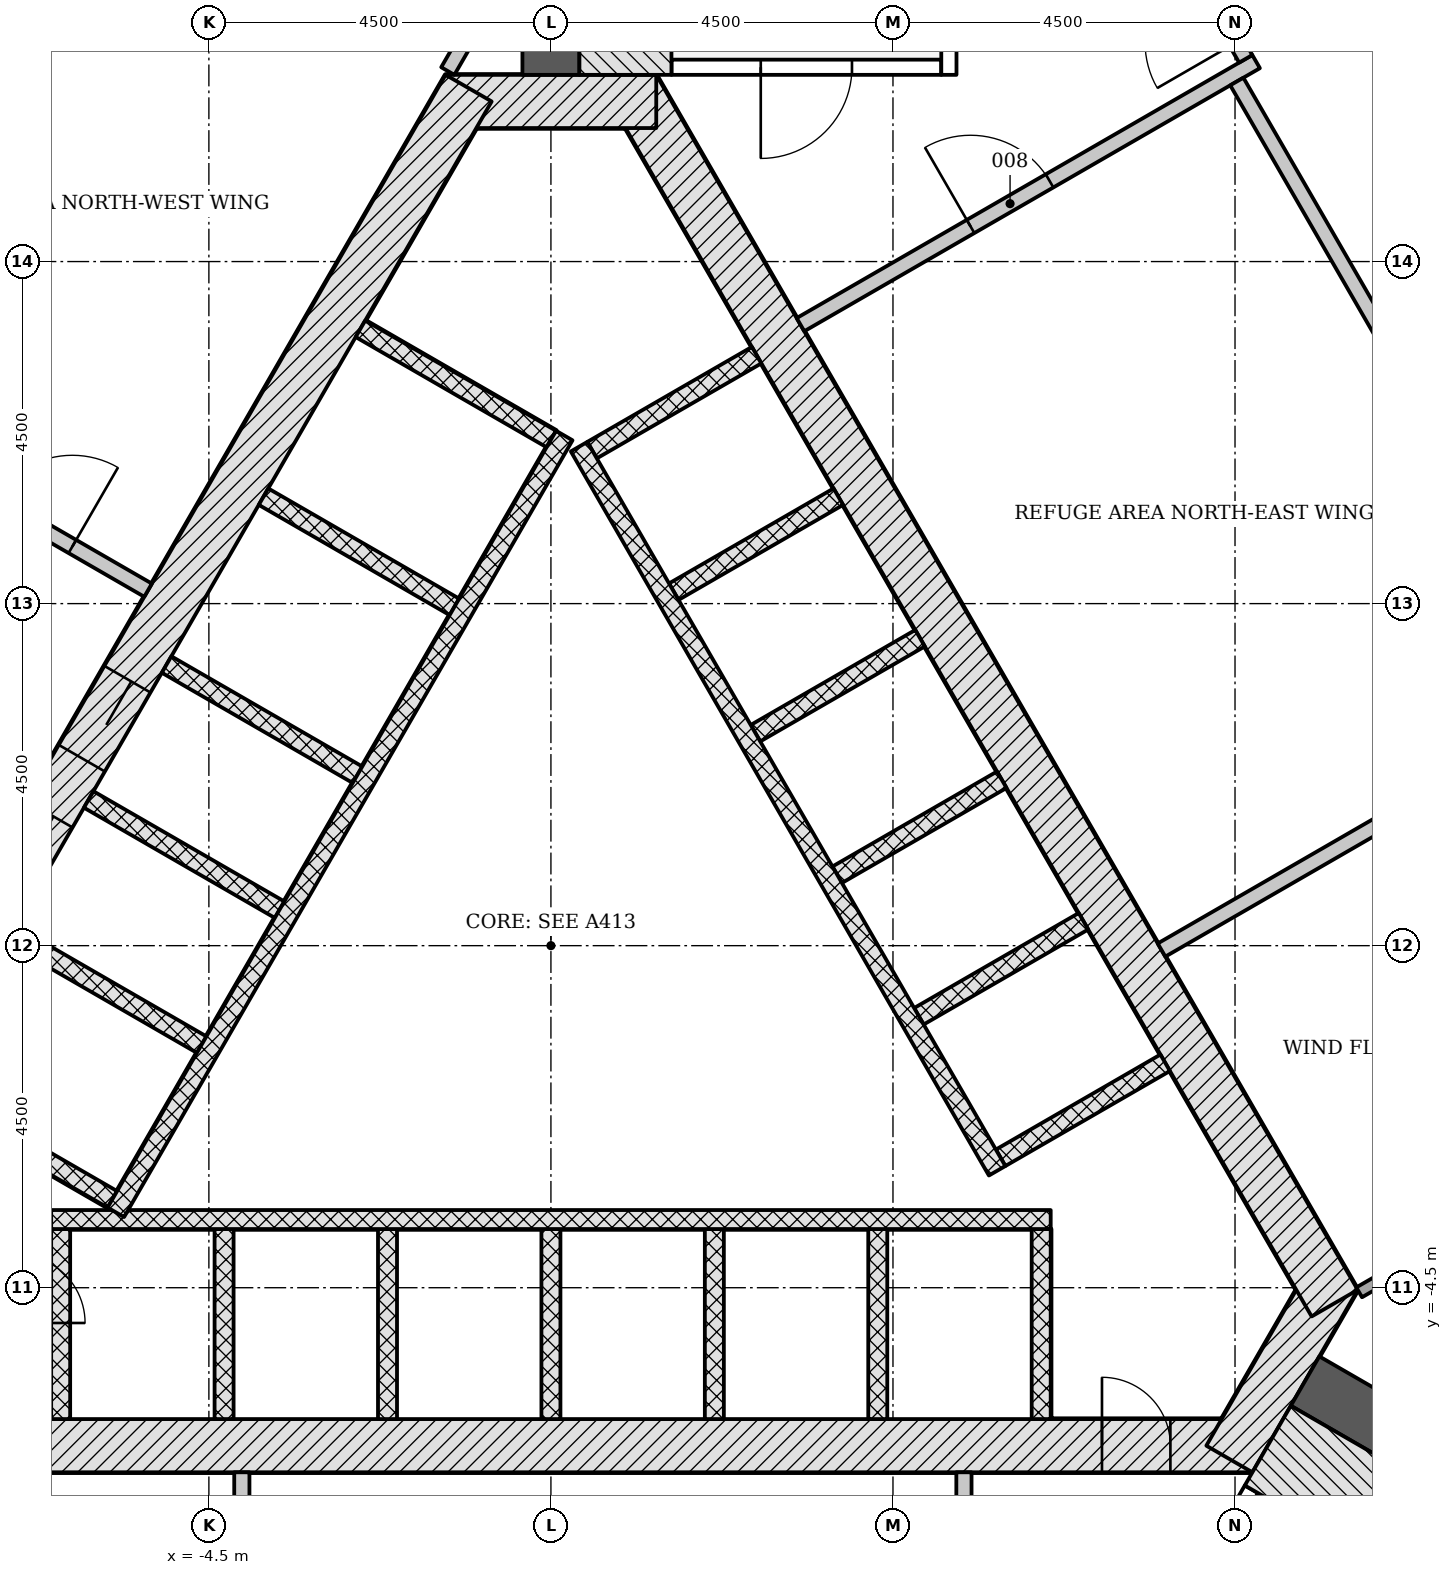
"""IFC4 building model, lengths in metres.
Left out: names, types, materials, properties, quantities, classifications, styles, units other than length and angle.
Written with IfcOpenShell. Run it as: python <this file> out.ifc"""

import sys

from ifc_helpers import new_model, si_unit, direction, frame, frame_2d, origin, place, context, subcontext, project, spatial, rectangle, extrude, element, fill, save


model = new_model("IFC4")
c1 = context("Model", 3, precision=1e-05, world=origin(), true_north=direction((0.0, 1.0)))
c2 = subcontext(c1, "Body", "Model", "MODEL_VIEW")
j1 = project(units=[si_unit("LENGTHUNIT", "METRE"), si_unit("PLANEANGLEUNIT", "RADIAN")], contexts=[c1])
p1 = place(None, origin())
s1 = spatial("IfcSite", under=j1, at=p1, CompositionType="ELEMENT")
p2 = place(p1, origin())
s2 = spatial("IfcBuilding", under=s1, at=p2, CompositionType="ELEMENT")
p3 = place(p2, frame((0.0, 0.0, 127.5)))
s3 = spatial("IfcBuildingStorey", under=s2, at=p3, CompositionType="ELEMENT", Elevation=127.5)
p4 = place(p3, frame((-9.229, -6.578, -0.3), z_axis=(0.0, 0.0, 1.0), x_axis=(1.0, 0.0, 0.0)))
e1 = element("IfcWall", 1, at=p4, inside=s3, PredefinedType="SHEAR", context=c2, shape_type="SweptSolid", body=[
    extrude(rectangle(XDim=18.458, YDim=0.7, at=frame_2d((9.229, 0.0))), origin(), (0.0, 0.0, 1.0), 7.2),
])
p5 = place(p4, frame((1.0, 0.0, 0.3)))
e2 = element("IfcOpeningElement", 2, at=p5, cuts=e1, PredefinedType="OPENING", context=c2, shape_type="SweptSolid", body=[
    extrude(rectangle(XDim=1.0, YDim=2.1, at=frame_2d((0.5, 1.05))), frame((0.0, 0.36, 0.0), z_axis=(0.0, -1.0, 0.0), x_axis=(1.0, 0.0, 0.0)), (0.0, 0.0, 1.0), 0.72),
])
p6 = place(p4, frame((16.479, 0.0, 0.3)))
e3 = element("IfcOpeningElement", 3, at=p6, cuts=e1, PredefinedType="OPENING", context=c2, shape_type="SweptSolid", body=[
    extrude(rectangle(XDim=0.9, YDim=2.1, at=frame_2d((0.45, 1.05))), frame((0.0, 0.36, 0.0), z_axis=(0.0, -1.0, 0.0), x_axis=(1.0, 0.0, 0.0)), (0.0, 0.0, 1.0), 0.72),
])
p7 = place(p3, frame((8.926, -6.753, -0.3), z_axis=(0.0, 0.0, 1.0), x_axis=(0.500042739161, 0.866000726912, 0.0)))
e4 = element("IfcWall", 4, at=p7, inside=s3, PredefinedType="SHEAR", context=c2, shape_type="SweptSolid", body=[
    extrude(rectangle(XDim=2.771, YDim=0.7, at=frame_2d((1.386, 0.0))), origin(), (0.0, 0.0, 1.0), 7.2),
])
p8 = place(p3, frame((10.311, -4.703, -0.3), z_axis=(0.0, 0.0, 1.0), x_axis=(-0.500001446645, 0.866024568562, 0.0)))
e5 = element("IfcWall", 5, at=p8, inside=s3, PredefinedType="SHEAR", context=c2, shape_type="SweptSolid", body=[
    extrude(rectangle(XDim=18.458, YDim=0.7, at=frame_2d((9.229, 0.0))), origin(), (0.0, 0.0, 1.0), 7.2),
])
p9 = place(p3, frame((1.386, 11.106, -0.3), z_axis=(0.0, 0.0, 1.0), x_axis=(-1.0, 0.0, 0.0)))
e6 = element("IfcWall", 6, at=p9, inside=s3, PredefinedType="SHEAR", context=c2, shape_type="SweptSolid", body=[
    extrude(rectangle(XDim=2.771, YDim=0.7, at=frame_2d((1.386, 0.0))), origin(), (0.0, 0.0, 1.0), 7.2),
])
p10 = place(p3, frame((-1.083, 11.281, -0.3), z_axis=(0.0, 0.0, 1.0), x_axis=(-0.500001446645, -0.866024568562, 0.0)))
e7 = element("IfcWall", 7, at=p10, inside=s3, PredefinedType="SHEAR", context=c2, shape_type="SweptSolid", body=[
    extrude(rectangle(XDim=18.458, YDim=0.7, at=frame_2d((9.229, 0.0))), origin(), (0.0, 0.0, 1.0), 7.2),
])
p11 = place(p10, frame((8.979, 0.0, 0.3)))
e8 = element("IfcOpeningElement", 8, at=p11, cuts=e7, PredefinedType="OPENING", context=c2, shape_type="SweptSolid", body=[
    extrude(rectangle(XDim=1.2, YDim=2.1, at=frame_2d((0.6, 1.05))), frame((0.0, 0.36, 0.0), z_axis=(0.0, -1.0, 0.0), x_axis=(1.0, 0.0, 0.0)), (0.0, 0.0, 1.0), 0.72),
])
p12 = place(p10, frame((11.029, 0.0, 0.3)))
e9 = element("IfcOpeningElement", 9, at=p12, cuts=e7, PredefinedType="OPENING", context=c2, shape_type="SweptSolid", body=[
    extrude(rectangle(XDim=1.2, YDim=2.1, at=frame_2d((0.6, 1.05))), frame((0.0, 0.36, 0.0), z_axis=(0.0, -1.0, 0.0), x_axis=(1.0, 0.0, 0.0)), (0.0, 0.0, 1.0), 0.72),
])
p13 = place(p3, frame((0.0, 11.456, -0.3), z_axis=(0.0, 0.0, 1.0), x_axis=(0.0, 1.0, 0.0)))
e10 = element("IfcWall", 10, at=p13, inside=s3, PredefinedType="SHEAR", context=c2, shape_type="SweptSolid", body=[
    extrude(rectangle(XDim=11.539, YDim=0.75, at=frame_2d((5.77, 0.0))), origin(), (0.0, 0.0, 1.0), 7.2),
])
p14 = place(p3, frame((9.922, -5.728, -0.3), z_axis=(0.0, 0.0, 1.0), x_axis=(0.866024913782, -0.500000848707, 0.0)))
e11 = element("IfcWall", 11, at=p14, inside=s3, PredefinedType="SHEAR", context=c2, shape_type="SweptSolid", body=[
    extrude(rectangle(XDim=11.539, YDim=0.75, at=frame_2d((5.769, 0.0))), origin(), (0.0, 0.0, 1.0), 7.2),
])
for number, where, z_axis, x_axis in (
    (12, (-6.45, -6.228, -0.3), (0.0, 0.0, 1.0), (0.0, 1.0, 0.0)),
    (13, (-4.3, -6.228, -0.3), (0.0, 0.0, 1.0), (0.0, 1.0, 0.0)),
    (14, (-2.15, -6.228, -0.3), (0.0, 0.0, 1.0), (0.0, 1.0, 0.0)),
    (15, (0.0, -6.228, -0.3), (0.0, 0.0, 1.0), (0.0, 1.0, 0.0)),
    (16, (2.15, -6.228, -0.3), (0.0, 0.0, 1.0), (0.0, 1.0, 0.0)),
    (17, (4.3, -6.228, -0.3), (0.0, 0.0, 1.0), (0.0, 1.0, 0.0)),
    (18, (6.45, -6.228, -0.3), (0.0, 0.0, 1.0), (0.0, 1.0, 0.0)),
):
    element("IfcWall", number, at=place(p3, frame(where, z_axis=z_axis, x_axis=x_axis)), inside=s3, PredefinedType="PARTITIONING", context=c2, shape_type="SweptSolid", body=[
        extrude(rectangle(XDim=2.5, YDim=0.25, at=frame_2d((1.25, 0.0))), origin(), (0.0, 0.0, 1.0), 7.2),
    ])
p15 = place(p3, frame((-6.575, -3.603, 0.0), z_axis=(0.0, 0.0, 1.0), x_axis=(1.0, 0.0, 0.0)))
e19 = element("IfcWall", 19, at=p15, inside=s3, PredefinedType="PARTITIONING", context=c2, shape_type="SweptSolid", body=[
    extrude(rectangle(XDim=13.15, YDim=0.25, at=frame_2d((6.575, 0.0))), origin(), (0.0, 0.0, 1.0), 6.9),
])
for number, where, z_axis, x_axis in (
    (20, (8.081, -1.541, 0.0), (0.0, 0.0, 1.0), (-0.866, -0.5, 0.0)),
    (21, (7.006, 0.321, 0.0), (0.0, 0.0, 1.0), (-0.866, -0.5, 0.0)),
):
    element("IfcWall", number, at=place(p3, frame(where, z_axis=z_axis, x_axis=x_axis)), inside=s3, PredefinedType="PARTITIONING", context=c2, shape_type="SweptSolid", body=[
        extrude(rectangle(XDim=2.5, YDim=0.25, at=frame_2d((1.25, 0.0))), origin(), (0.0, 0.0, 1.0), 6.9),
    ])
p16 = place(p3, frame((5.931, 2.183, 0.0), z_axis=(0.0, 0.0, 1.0), x_axis=(-0.866047370643, -0.499961950354, 0.0)))
e22 = element("IfcWall", 22, at=p16, inside=s3, PredefinedType="PARTITIONING", context=c2, shape_type="SweptSolid", body=[
    extrude(rectangle(XDim=2.5, YDim=0.25, at=frame_2d((1.25, 0.0))), origin(), (0.0, 0.0, 1.0), 6.9),
])
for number, where, z_axis, x_axis in (
    (23, (4.856, 4.045, 0.0), (0.0, 0.0, 1.0), (-0.866, -0.5, 0.0)),
    (24, (3.781, 5.907, 0.0), (0.0, 0.0, 1.0), (-0.866, -0.5, 0.0)),
    (25, (2.706, 7.769, 0.0), (0.0, 0.0, 1.0), (-0.866, -0.5, 0.0)),
):
    element("IfcWall", number, at=place(p3, frame(where, z_axis=z_axis, x_axis=x_axis)), inside=s3, PredefinedType="PARTITIONING", context=c2, shape_type="SweptSolid", body=[
        extrude(rectangle(XDim=2.5, YDim=0.25, at=frame_2d((1.25, 0.0))), origin(), (0.0, 0.0, 1.0), 6.9),
    ])
p17 = place(p3, frame((5.87, -2.961, 0.0), z_axis=(0.0, 0.0, 1.0), x_axis=(-0.50000615651, 0.866021849293, 0.0)))
e26 = element("IfcWall", 26, at=p17, inside=s3, PredefinedType="PARTITIONING", context=c2, shape_type="SweptSolid", body=[
    extrude(rectangle(XDim=11.0, YDim=0.25, at=frame_2d((5.5, 0.0))), origin(), (0.0, 0.0, 1.0), 6.9),
])
p18 = place(p3, frame((-2.506, 8.115, -0.3), z_axis=(0.0, 0.0, 1.0), x_axis=(0.865996321171, -0.50005036918, 0.0)))
e27 = element("IfcWall", 27, at=p18, inside=s3, PredefinedType="PARTITIONING", context=c2, shape_type="SweptSolid", body=[
    extrude(rectangle(XDim=2.9, YDim=0.25, at=frame_2d((1.45, 0.0))), origin(), (0.0, 0.0, 1.0), 7.2),
])
for number, where, z_axis, x_axis in (
    (28, (-3.781, 5.907, -0.3), (0.0, 0.0, 1.0), (0.866, -0.5, 0.0)),
    (29, (-5.056, 3.699, -0.3), (0.0, 0.0, 1.0), (0.866, -0.5, 0.0)),
    (30, (-6.081, 1.923, -0.3), (0.0, 0.0, 1.0), (0.866, -0.5, 0.0)),
    (31, (-7.106, 0.148, -0.3), (0.0, 0.0, 1.0), (0.866, -0.5, 0.0)),
    (32, (-8.281, -1.887, -0.3), (0.0, 0.0, 1.0), (0.866, -0.5, 0.0)),
):
    element("IfcWall", number, at=place(p3, frame(where, z_axis=z_axis, x_axis=x_axis)), inside=s3, PredefinedType="PARTITIONING", context=c2, shape_type="SweptSolid", body=[
        extrude(rectangle(XDim=2.9, YDim=0.25, at=frame_2d((1.45, 0.0))), origin(), (0.0, 0.0, 1.0), 7.2),
    ])
p19 = place(p3, frame((0.176, 6.711, 0.0), z_axis=(0.0, 0.0, 1.0), x_axis=(-0.500004227369, -0.866022963098, 0.0)))
e33 = element("IfcWall", 33, at=p19, inside=s3, PredefinedType="PARTITIONING", context=c2, shape_type="SweptSolid", body=[
    extrude(rectangle(XDim=11.8, YDim=0.25, at=frame_2d((5.9, 0.0))), origin(), (0.0, 0.0, 1.0), 6.9),
])
p20 = place(p3, frame((5.135, 11.556, -0.3), z_axis=(0.0, 0.0, 1.0), x_axis=(-1.0, 0.0, 0.0)))
e34 = element("IfcWall", 34, at=p20, inside=s3, PredefinedType="SHEAR", context=c2, shape_type="SweptSolid", body=[
    extrude(rectangle(XDim=3.55, YDim=0.2, at=frame_2d((1.775, 0.0))), origin(), (0.0, 0.0, 1.0), 7.2),
])
p21 = place(p20, frame((1.175, 0.0, 0.3)))
e35 = element("IfcOpeningElement", 35, at=p21, cuts=e34, PredefinedType="OPENING", context=c2, shape_type="SweptSolid", body=[
    extrude(rectangle(XDim=1.2, YDim=2.1, at=frame_2d((0.6, 1.05))), frame((0.0, 0.11, 0.0), z_axis=(0.0, -1.0, 0.0), x_axis=(1.0, 0.0, 0.0)), (0.0, 0.0, 1.0), 0.22),
])
p22 = place(p3, frame((5.236, 11.456, -0.3), z_axis=(0.0, 0.0, 1.0), x_axis=(0.0, 1.0, 0.0)))
e36 = element("IfcWall", 36, at=p22, inside=s3, PredefinedType="SHEAR", context=c2, shape_type="SweptSolid", body=[
    extrude(rectangle(XDim=5.6, YDim=0.2, at=frame_2d((2.8, 0.0))), origin(), (0.0, 0.0, 1.0), 7.2),
])
p23 = place(p22, frame((0.45, 0.0, 0.3)))
e37 = element("IfcOpeningElement", 37, at=p23, cuts=e36, PredefinedType="OPENING", context=c2, shape_type="SweptSolid", body=[
    extrude(rectangle(XDim=1.2, YDim=2.1, at=frame_2d((0.6, 1.05))), frame((0.0, 0.11, 0.0), z_axis=(0.0, -1.0, 0.0), x_axis=(1.0, 0.0, 0.0)), (0.0, 0.0, 1.0), 0.22),
])
p24 = place(p3, frame((0.98, 11.456, -0.3), z_axis=(0.0, 0.0, 1.0), x_axis=(0.0, 1.0, 0.0)))
e38 = element("IfcWall", 38, at=p24, inside=s3, PredefinedType="SHEAR", context=c2, shape_type="SweptSolid", body=[
    extrude(rectangle(XDim=7.2, YDim=1.211, at=frame_2d((3.6, 0.0))), origin(), (0.0, 0.0, 1.0), 7.2),
])
p25 = place(p3, frame((7.44, -10.226, -0.3), z_axis=(0.0, 0.0, 1.0), x_axis=(0.500022077904, 0.866012656725, 0.0)))
e39 = element("IfcWall", 39, at=p25, inside=s3, PredefinedType="SHEAR", context=c2, shape_type="SweptSolid", body=[
    extrude(rectangle(XDim=3.55, YDim=0.2, at=frame_2d((1.775, 0.0))), origin(), (0.0, 0.0, 1.0), 7.2),
])
p26 = place(p25, frame((1.175, 0.0, 0.3)))
e40 = element("IfcOpeningElement", 40, at=p26, cuts=e39, PredefinedType="OPENING", context=c2, shape_type="SweptSolid", body=[
    extrude(rectangle(XDim=1.2, YDim=2.1, at=frame_2d((0.6, 1.05))), frame((0.0, 0.11, 0.0), z_axis=(0.0, -1.0, 0.0), x_axis=(1.0, 0.0, 0.0)), (0.0, 0.0, 1.0), 0.22),
])
p27 = place(p3, frame((9.431, -6.577, -0.3), z_axis=(0.0, 0.0, 1.0), x_axis=(0.866018442252, -0.500012057535, 0.0)))
e41 = element("IfcWall", 41, at=p27, inside=s3, PredefinedType="SHEAR", context=c2, shape_type="SweptSolid", body=[
    extrude(rectangle(XDim=7.2, YDim=1.211, at=frame_2d((3.6, 0.0))), origin(), (0.0, 0.0, 1.0), 7.2),
])
p28 = place(p3, frame((-11.077, 8.012, 0.0), z_axis=(0.0, 0.0, 1.0), x_axis=(0.866022858982, -0.500004407701, 0.0)))
e42 = element("IfcWall", 42, at=p28, inside=s3, PredefinedType="PARTITIONING", context=c2, shape_type="SweptSolid", body=[
    extrude(rectangle(XDim=6.671, YDim=0.2, at=frame_2d((3.335, 0.0))), origin(), (0.0, 0.0, 1.0), 6.9),
])
p29 = place(p28, frame((4.321, 0.0, 0.0)))
e43 = element("IfcOpeningElement", 43, at=p29, cuts=e42, PredefinedType="OPENING", context=c2, shape_type="SweptSolid", body=[
    extrude(rectangle(XDim=1.2, YDim=2.1, at=frame_2d((0.6, 1.05))), frame((0.0, 0.11, 0.0), z_axis=(0.0, -1.0, 0.0), x_axis=(1.0, 0.0, 0.0)), (0.0, 0.0, 1.0), 0.22),
])
p30 = place(p3, frame((-1.357, 11.506, 0.0), z_axis=(0.0, 0.0, 1.0), x_axis=(0.499923888995, 0.866069342035, 0.0)))
e44 = element("IfcWall", 44, at=p30, inside=s3, PredefinedType="PARTITIONING", context=c2, shape_type="SweptSolid", body=[
    extrude(rectangle(XDim=1.714, YDim=0.2, at=frame_2d((0.857, 0.0))), origin(), (0.0, 0.0, 1.0), 6.9),
])
p31 = place(p3, frame((-6.291, 16.103, 0.0), z_axis=(0.0, 0.0, 1.0), x_axis=(-0.500015592816, -0.866016401081, 0.0)))
e45 = element("IfcWall", 45, at=p31, inside=s3, PredefinedType="PARTITIONING", context=c2, shape_type="SweptSolid", body=[
    extrude(rectangle(XDim=9.3, YDim=0.2, at=frame_2d((4.65, 0.0))), origin(), (0.0, 0.0, 1.0), 6.347),
])
p32 = place(p3, frame((5.434, -13.85, 0.0), z_axis=(0.0, 0.0, 1.0), x_axis=(0.0, 1.0, 0.0)))
e46 = element("IfcWall", 46, at=p32, inside=s3, PredefinedType="PARTITIONING", context=c2, shape_type="SweptSolid", body=[
    extrude(rectangle(XDim=6.922, YDim=0.2, at=frame_2d((3.461, 0.0))), origin(), (0.0, 0.0, 1.0), 6.9),
])
p33 = place(p32, frame((3.138, 0.0, 0.0)))
e47 = element("IfcOpeningElement", 47, at=p33, cuts=e46, PredefinedType="OPENING", context=c2, shape_type="SweptSolid", body=[
    extrude(rectangle(XDim=1.2, YDim=2.1, at=frame_2d((0.6, 1.05))), frame((0.0, 0.11, 0.0), z_axis=(0.0, -1.0, 0.0), x_axis=(1.0, 0.0, 0.0)), (0.0, 0.0, 1.0), 0.22),
])
p34 = place(p3, frame((-4.066, -13.399, 0.0), z_axis=(0.0, 0.0, 1.0), x_axis=(0.0, 1.0, 0.0)))
e48 = element("IfcWall", 48, at=p34, inside=s3, PredefinedType="PARTITIONING", context=c2, shape_type="SweptSolid", body=[
    extrude(rectangle(XDim=6.471, YDim=0.2, at=frame_2d((3.235, 0.0))), origin(), (0.0, 0.0, 1.0), 6.9),
])
p35 = place(p3, frame((3.283, 8.17, 0.0), z_axis=(0.0, 0.0, 1.0), x_axis=(0.866035807126, 0.499981980451, 0.0)))
e49 = element("IfcWall", 49, at=p35, inside=s3, PredefinedType="PARTITIONING", context=c2, shape_type="SweptSolid", body=[
    extrude(rectangle(XDim=6.922, YDim=0.2, at=frame_2d((3.461, 0.0))), origin(), (0.0, 0.0, 1.0), 6.9),
])
p36 = place(p35, frame((2.584, 0.0, 0.0)))
e50 = element("IfcOpeningElement", 50, at=p36, cuts=e49, PredefinedType="OPENING", context=c2, shape_type="SweptSolid", body=[
    extrude(rectangle(XDim=1.2, YDim=2.1, at=frame_2d((0.6, 1.05))), frame((0.0, 0.11, 0.0), z_axis=(0.0, -1.0, 0.0), x_axis=(1.0, 0.0, 0.0)), (0.0, 0.0, 1.0), 0.22),
])
p37 = place(p3, frame((9.024, 11.369, 0.0), z_axis=(0.0, 0.0, 1.0), x_axis=(0.499997557548, -0.86602681393, 0.0)))
e51 = element("IfcWall", 51, at=p37, inside=s3, PredefinedType="PARTITIONING", context=c2, shape_type="SweptSolid", body=[
    extrude(rectangle(XDim=9.5, YDim=0.2, at=frame_2d((4.75, 0.0))), origin(), (0.0, 0.0, 1.0), 6.347),
])
p38 = place(p3, frame((9.141, 11.667, 0.0), z_axis=(0.0, 0.0, 1.0), x_axis=(-0.500013872438, 0.86601739438, 0.0)))
e52 = element("IfcWall", 52, at=p38, inside=s3, PredefinedType="PARTITIONING", context=c2, shape_type="SweptSolid", body=[
    extrude(rectangle(XDim=4.859, YDim=0.2, at=frame_2d((2.429, 0.0))), origin(), (0.0, 0.0, 1.0), 6.423),
])
p39 = place(p38, frame((0.249, 0.0, 0.0)))
e53 = element("IfcOpeningElement", 53, at=p39, cuts=e52, PredefinedType="OPENING", context=c2, shape_type="SweptSolid", body=[
    extrude(rectangle(XDim=1.2, YDim=2.1, at=frame_2d((0.6, 1.05))), frame((0.0, 0.11, 0.0), z_axis=(0.0, -1.0, 0.0), x_axis=(1.0, 0.0, 0.0)), (0.0, 0.0, 1.0), 0.22),
])
p40 = place(p3, frame((8.033, -0.058, 0.0), z_axis=(0.0, 0.0, 1.0), x_axis=(0.866017203851, 0.500014202433, 0.0)))
e54 = element("IfcWall", 54, at=p40, inside=s3, PredefinedType="PARTITIONING", context=c2, shape_type="SweptSolid", body=[
    extrude(rectangle(XDim=6.471, YDim=0.2, at=frame_2d((3.235, 0.0))), origin(), (0.0, 0.0, 1.0), 6.9),
])
p41 = place(p3, frame((10.633, -4.561, 0.0), z_axis=(0.0, 0.0, 1.0), x_axis=(0.866019999656, 0.500009360108, 0.0)))
e55 = element("IfcWall", 55, at=p41, inside=s3, PredefinedType="PARTITIONING", context=c2, shape_type="SweptSolid", body=[
    extrude(rectangle(XDim=4.125, YDim=0.15, at=frame_2d((2.062, 0.0))), origin(), (0.0, 0.0, 1.0), 6.9),
])
p42 = place(p11, origin())
e56 = element("IfcDoor", 56, at=p42, inside=s3, OperationType="DOUBLE_DOOR_SLIDING", PredefinedType="DOOR", context=c2, shape_type="SweptSolid", body=[
    extrude(rectangle(XDim=1.2, YDim=2.1, at=frame_2d((0.6, 1.05))), frame((0.0, 0.025, 0.0), z_axis=(0.0, -1.0, 0.0), x_axis=(1.0, 0.0, 0.0)), (0.0, 0.0, 1.0), 0.05),
])
fill(e8, e56)
p43 = place(p6, origin())
e57 = element("IfcDoor", 57, at=p43, inside=s3, OperationType="SINGLE_SWING_LEFT", PredefinedType="DOOR", context=c2, shape_type="SweptSolid", body=[
    extrude(rectangle(XDim=0.9, YDim=2.1, at=frame_2d((0.45, 1.05))), frame((0.0, 0.075, 0.0), z_axis=(0.0, -1.0, 0.0), x_axis=(1.0, 0.0, 0.0)), (0.0, 0.0, 1.0), 0.15),
])
fill(e3, e57)
p44 = place(p21, origin())
e58 = element("IfcDoor", 58, at=p44, inside=s3, OperationType="SINGLE_SWING_RIGHT", PredefinedType="DOOR", context=c2, shape_type="SweptSolid", body=[
    extrude(rectangle(XDim=1.2, YDim=2.1, at=frame_2d((0.6, 1.05))), frame((0.0, 0.025, 0.0), z_axis=(0.0, -1.0, 0.0), x_axis=(1.0, 0.0, 0.0)), (0.0, 0.0, 1.0), 0.05),
])
fill(e35, e58)
p45 = place(p29, origin())
e59 = element("IfcDoor", 59, at=p45, inside=s3, OperationType="SINGLE_SWING_RIGHT", PredefinedType="DOOR", context=c2, shape_type="SweptSolid", body=[
    extrude(rectangle(XDim=1.2, YDim=2.1, at=frame_2d((0.6, 1.05))), frame((0.0, 0.025, 0.0), z_axis=(0.0, -1.0, 0.0), x_axis=(1.0, 0.0, 0.0)), (0.0, 0.0, 1.0), 0.05),
])
fill(e43, e59)
p46 = place(p36, origin())
e60 = element("IfcDoor", 60, at=p46, inside=s3, OperationType="SINGLE_SWING_LEFT", PredefinedType="DOOR", context=c2, shape_type="SweptSolid", body=[
    extrude(rectangle(XDim=1.2, YDim=2.1, at=frame_2d((0.6, 1.05))), frame((0.0, 0.025, 0.0), z_axis=(0.0, -1.0, 0.0), x_axis=(1.0, 0.0, 0.0)), (0.0, 0.0, 1.0), 0.05),
])
fill(e50, e60)
save(model, sys.argv[1])
